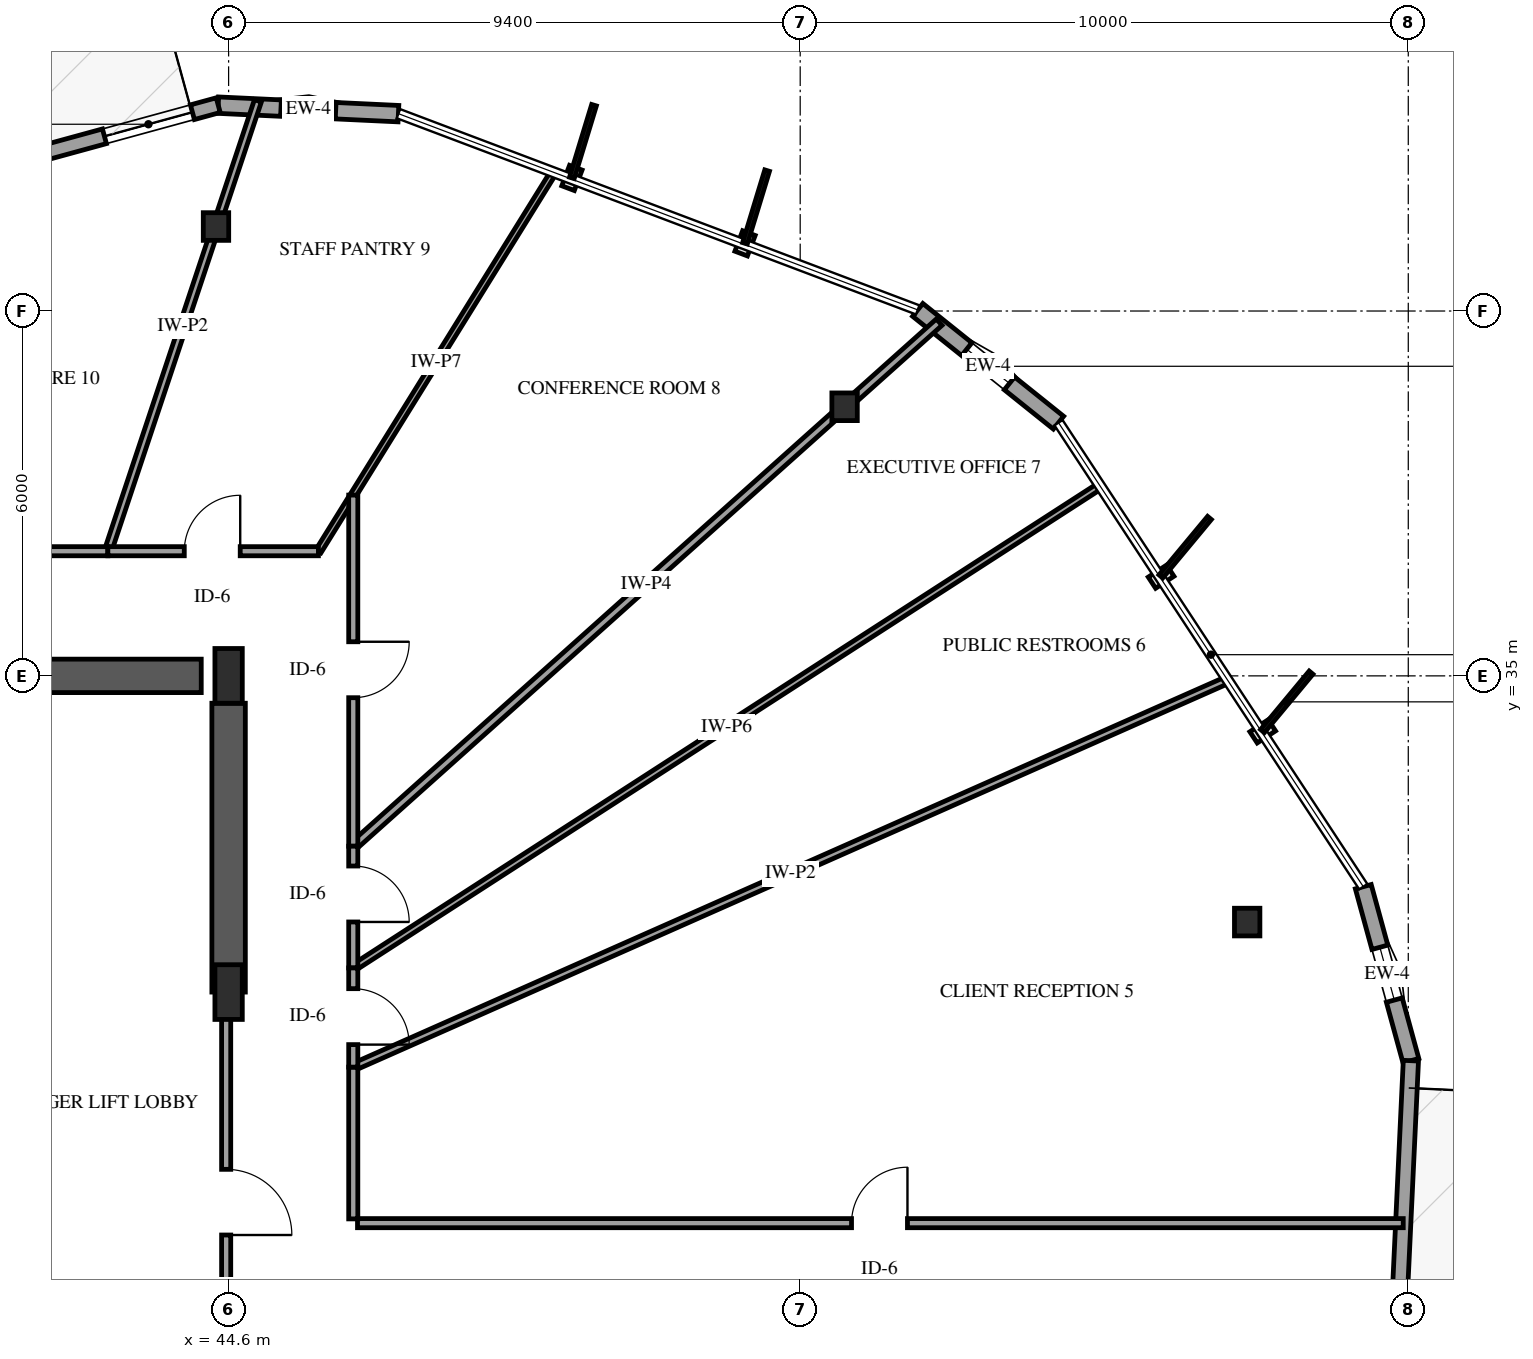
"""IFC4 building model, lengths in metres.
Left out: names, types, materials, properties, quantities, classifications, styles, units other than length and angle.
Written with IfcOpenShell. Run it as: python <this file> out.ifc"""

import sys

from ifc_helpers import new_model, si_unit, direction, frame, frame_2d, origin, origin_2d, place, context, subcontext, project, spatial, rectangle, i_section, extrude, element, fill, save


model = new_model("IFC4")
c1 = context("Model", 3, precision=1e-05, world=origin(), true_north=direction((0.0, 1.0)))
c2 = subcontext(c1, "Body", "Model", "MODEL_VIEW")
j1 = project(units=[si_unit("LENGTHUNIT", "METRE"), si_unit("PLANEANGLEUNIT", "RADIAN")], contexts=[c1])
p1 = place(None, origin())
s1 = spatial("IfcSite", under=j1, at=p1, CompositionType="ELEMENT")
p2 = place(p1, origin())
s2 = spatial("IfcBuilding", under=s1, at=p2, CompositionType="ELEMENT")
p3 = place(p2, frame((0.0, 0.0, 87.4)))
s3 = spatial("IfcBuildingStorey", under=s2, at=p3, CompositionType="ELEMENT", Elevation=87.4)
p4 = place(p3, frame((41.3, 35.0, 0.0), z_axis=(0.0, 0.0, 1.0), x_axis=(1.0, 0.0, 0.0)))
e1 = element("IfcWall", 1, at=p4, inside=s3, PredefinedType="SHEAR", context=c2, shape_type="SweptSolid", body=[
    extrude(rectangle(XDim=2.85, YDim=0.55, at=frame_2d((1.425, 0.0))), origin(), (0.0, 0.0, 1.0), 3.9),
])
p5 = place(p3, frame((44.6, 29.8, 0.0), z_axis=(0.0, 0.0, 1.0), x_axis=(0.0, 1.0, 0.0)))
e2 = element("IfcWall", 2, at=p5, inside=s3, PredefinedType="SHEAR", context=c2, shape_type="SweptSolid", body=[
    extrude(rectangle(XDim=4.75, YDim=0.55, at=frame_2d((2.375, 0.0))), origin(), (0.0, 0.0, 1.0), 3.9),
])
for number, where, z_axis, x_axis in (
    (3, (44.6, 29.8, -0.3), (0.0, 0.0, 1.0), (1.0, 0.0, 0.0)),
    (4, (44.6, 35.0, -0.3), (0.0, 0.0, 1.0), (1.0, 0.0, 0.0)),
):
    element("IfcColumn", number, at=place(p3, frame(where, z_axis=z_axis, x_axis=x_axis)), inside=s3, PredefinedType="PILASTER", context=c2, shape_type="SweptSolid", body=[
        extrude(rectangle(XDim=0.45, YDim=0.9, at=origin_2d()), origin(), (0.0, 0.0, 1.0), 4.2),
    ])
for number, where, z_axis, x_axis in (
    (5, (61.351, 30.951, -0.3), (0.0, 0.0, 1.0), (1.0, 0.0, 0.0)),
    (6, (54.73, 39.425, -0.3), (0.0, 0.0, 1.0), (1.0, 0.0, 0.0)),
    (7, (44.393, 42.389, -0.3), (0.0, 0.0, 1.0), (1.0, 0.0, 0.0)),
):
    element("IfcColumn", number, at=place(p3, frame(where, z_axis=z_axis, x_axis=x_axis)), inside=s3, PredefinedType="COLUMN", context=c2, shape_type="SweptSolid", body=[
        extrude(i_section(OverallWidth=0.418, OverallDepth=0.455, WebThickness=0.042, FlangeThickness=0.068, FilletRadius=0.038, at=origin_2d()), origin(), (0.0, 0.0, 1.0), 4.2),
    ])
p6 = place(p3, frame((58.248, 39.164, 0.0), z_axis=(0.0, 0.0, 1.0), x_axis=(-0.780443081308, 0.625226836307, 0.0)))
e8 = element("IfcWall", 8, at=p6, inside=s3, PredefinedType="SOLIDWALL", context=c2, shape_type="SweptSolid", body=[
    extrude(rectangle(XDim=2.967, YDim=0.27, at=frame_2d((1.483, 0.0))), origin(), (0.0, 0.0, 1.0), 2.979),
])
p7 = place(p6, frame((1.033, 0.0, 0.75)))
e9 = element("IfcOpeningElement", 9, at=p7, cuts=e8, PredefinedType="OPENING", context=c2, shape_type="SweptSolid", body=[
    extrude(rectangle(XDim=0.9, YDim=1.5, at=frame_2d((0.45, 0.75))), frame((0.0, 0.145, 0.0), z_axis=(0.0, -1.0, 0.0), x_axis=(1.0, 0.0, 0.0)), (0.0, 0.0, 1.0), 0.29),
])
p8 = place(p3, frame((47.393, 44.246, 0.0), z_axis=(0.0, 0.0, 1.0), x_axis=(-0.998887602896, 0.04715460508, 0.0)))
e10 = element("IfcWall", 10, at=p8, inside=s3, PredefinedType="SOLIDWALL", context=c2, shape_type="SweptSolid", body=[
    extrude(rectangle(XDim=2.967, YDim=0.27, at=frame_2d((1.483, 0.0))), origin(), (0.0, 0.0, 1.0), 2.979),
])
p9 = place(p8, frame((1.033, 0.0, 0.75)))
e11 = element("IfcOpeningElement", 11, at=p9, cuts=e10, PredefinedType="OPENING", context=c2, shape_type="SweptSolid", body=[
    extrude(rectangle(XDim=0.9, YDim=1.5, at=frame_2d((0.45, 0.75))), frame((0.0, 0.145, 0.0), z_axis=(0.0, -1.0, 0.0), x_axis=(1.0, 0.0, 0.0)), (0.0, 0.0, 1.0), 0.29),
])
p10 = place(p3, frame((44.429, 44.385, 0.0), z_axis=(0.0, 0.0, 1.0), x_axis=(-0.964553074607, -0.263888927894, 0.0)))
e12 = element("IfcWall", 12, at=p10, inside=s3, PredefinedType="SOLIDWALL", context=c2, shape_type="SweptSolid", body=[
    extrude(rectangle(XDim=9.13, YDim=0.25, at=frame_2d((4.565, 0.0))), origin(), (0.0, 0.0, 1.0), 2.979),
])
p11 = place(p10, frame((4.065, 0.0, 0.0)))
e13 = element("IfcOpeningElement", 13, at=p11, cuts=e12, PredefinedType="OPENING", context=c2, shape_type="SweptSolid", body=[
    extrude(rectangle(XDim=1.05, YDim=2.15, at=frame_2d((0.525, 1.075))), frame((0.0, 0.135, 0.0), z_axis=(0.0, -1.0, 0.0), x_axis=(1.0, 0.0, 0.0)), (0.0, 0.0, 1.0), 0.27),
])
p12 = place(p10, frame((0.44, 0.0, 0.72)))
e14 = element("IfcOpeningElement", 14, at=p12, cuts=e12, PredefinedType="OPENING", context=c2, shape_type="SweptSolid", body=[
    extrude(rectangle(XDim=1.5, YDim=1.7, at=frame_2d((0.75, 0.85))), frame((0.0, 0.135, 0.0), z_axis=(0.0, -1.0, 0.0), x_axis=(1.0, 0.0, 0.0)), (0.0, 0.0, 1.0), 0.27),
])
p13 = place(p10, frame((5.755, 0.0, 0.72)))
e15 = element("IfcOpeningElement", 15, at=p13, cuts=e12, PredefinedType="OPENING", context=c2, shape_type="SweptSolid", body=[
    extrude(rectangle(XDim=1.5, YDim=1.7, at=frame_2d((0.75, 0.85))), frame((0.0, 0.135, 0.0), z_axis=(0.0, -1.0, 0.0), x_axis=(1.0, 0.0, 0.0)), (0.0, 0.0, 1.0), 0.27),
])
p14 = place(p3, frame((64.043, 28.672, 0.0), z_axis=(0.0, 0.0, 1.0), x_axis=(-0.263855501226, 0.964562219078, 0.0)))
e16 = element("IfcWall", 16, at=p14, inside=s3, PredefinedType="SOLIDWALL", context=c2, shape_type="SweptSolid", body=[
    extrude(rectangle(XDim=2.967, YDim=0.27, at=frame_2d((1.483, 0.0))), origin(), (0.0, 0.0, 1.0), 2.979),
])
p15 = place(p14, frame((1.033, 0.0, 0.75)))
e17 = element("IfcOpeningElement", 17, at=p15, cuts=e16, PredefinedType="OPENING", context=c2, shape_type="SweptSolid", body=[
    extrude(rectangle(XDim=0.9, YDim=1.5, at=frame_2d((0.45, 0.75))), frame((0.0, 0.145, 0.0), z_axis=(0.0, -1.0, 0.0), x_axis=(1.0, 0.0, 0.0)), (0.0, 0.0, 1.0), 0.29),
])
p16 = place(p3, frame((63.613, 19.552, 0.0), z_axis=(0.0, 0.0, 1.0), x_axis=(0.047119184575, 0.998889274367, 0.0)))
e18 = element("IfcWall", 18, at=p16, inside=s3, PredefinedType="SOLIDWALL", context=c2, shape_type="SweptSolid", body=[
    extrude(rectangle(XDim=9.13, YDim=0.25, at=frame_2d((4.565, 0.0))), origin(), (0.0, 0.0, 1.0), 2.979),
])
p17 = place(p16, frame((0.65, 0.0, 0.0)))
e19 = element("IfcOpeningElement", 19, at=p17, cuts=e18, PredefinedType="OPENING", context=c2, shape_type="SweptSolid", body=[
    extrude(rectangle(XDim=1.05, YDim=2.15, at=frame_2d((0.525, 1.075))), frame((0.0, 0.135, 0.0), z_axis=(0.0, -1.0, 0.0), x_axis=(1.0, 0.0, 0.0)), (0.0, 0.0, 1.0), 0.27),
])
p18 = place(p16, frame((2.34, 0.0, 0.72)))
e20 = element("IfcOpeningElement", 20, at=p18, cuts=e18, PredefinedType="OPENING", context=c2, shape_type="SweptSolid", body=[
    extrude(rectangle(XDim=1.5, YDim=1.7, at=frame_2d((0.75, 0.85))), frame((0.0, 0.135, 0.0), z_axis=(0.0, -1.0, 0.0), x_axis=(1.0, 0.0, 0.0)), (0.0, 0.0, 1.0), 0.27),
])
p19 = place(p3, frame((46.72, 26.0, 0.0), z_axis=(0.0, 0.0, 1.0), x_axis=(1.0, 0.0, 0.0)))
e21 = element("IfcWall", 21, at=p19, inside=s3, PredefinedType="PARTITIONING", context=c2, shape_type="SweptSolid", body=[
    extrude(rectangle(XDim=17.197, YDim=0.15, at=frame_2d((8.599, 0.0))), origin(), (0.0, 0.0, 1.0), 2.974),
])
p20 = place(p19, frame((8.124, 0.0, 0.0)))
e22 = element("IfcOpeningElement", 22, at=p20, cuts=e21, PredefinedType="OPENING", context=c2, shape_type="SweptSolid", body=[
    extrude(rectangle(XDim=0.92, YDim=2.12, at=frame_2d((0.46, 1.06))), frame((0.0, 0.085, 0.0), z_axis=(0.0, -1.0, 0.0), x_axis=(1.0, 0.0, 0.0)), (0.0, 0.0, 1.0), 0.17),
])
p21 = place(p3, frame((46.65, 28.566, 0.0), z_axis=(0.0, 0.0, 1.0), x_axis=(0.91434602256, 0.404933761286, 0.0)))
e23 = element("IfcWall", 23, at=p21, inside=s3, PredefinedType="PARTITIONING", context=c2, shape_type="SweptSolid", body=[
    extrude(rectangle(XDim=15.724, YDim=0.12, at=frame_2d((7.862, 0.0))), origin(), (0.0, 0.0, 1.0), 3.6),
])
p22 = place(p3, frame((46.65, 30.197, 0.0), z_axis=(0.0, 0.0, 1.0), x_axis=(0.840128967458, 0.542386686818, 0.0)))
e24 = element("IfcWall", 24, at=p22, inside=s3, PredefinedType="PARTITIONING", context=c2, shape_type="SweptSolid", body=[
    extrude(rectangle(XDim=14.617, YDim=0.11, at=frame_2d((7.309, 0.0))), origin(), (0.0, 0.0, 1.0), 3.6),
])
p23 = place(p3, frame((46.65, 32.199, 0.0), z_axis=(0.0, 0.0, 1.0), x_axis=(0.745385521988, 0.666633650223, 0.0)))
e25 = element("IfcWall", 25, at=p23, inside=s3, PredefinedType="PARTITIONING", context=c2, shape_type="SweptSolid", body=[
    extrude(rectangle(XDim=12.927, YDim=0.14, at=frame_2d((6.464, 0.0))), origin(), (0.0, 0.0, 1.0), 3.6),
])
p24 = place(p3, frame((42.614, 37.05, 0.0), z_axis=(0.0, 0.0, 1.0), x_axis=(0.316115189383, 0.948720816174, 0.0)))
e26 = element("IfcWall", 26, at=p24, inside=s3, PredefinedType="PARTITIONING", context=c2, shape_type="SweptSolid", body=[
    extrude(rectangle(XDim=7.807, YDim=0.12, at=frame_2d((3.904, 0.0))), origin(), (0.0, 0.0, 1.0), 2.895),
])
p25 = place(p3, frame((34.81, 37.05, 0.0), z_axis=(0.0, 0.0, 1.0), x_axis=(1.0, 0.0, 0.0)))
e27 = element("IfcWall", 27, at=p25, inside=s3, PredefinedType="PARTITIONING", context=c2, shape_type="SweptSolid", body=[
    extrude(rectangle(XDim=7.804, YDim=0.15, at=frame_2d((3.902, 0.0))), origin(), (0.0, 0.0, 1.0), 3.6),
])
p26 = place(p25, frame((3.427, 0.0, 0.0)))
e28 = element("IfcOpeningElement", 28, at=p26, cuts=e27, PredefinedType="OPENING", context=c2, shape_type="SweptSolid", body=[
    extrude(rectangle(XDim=0.92, YDim=2.12, at=frame_2d((0.46, 1.06))), frame((0.0, 0.085, 0.0), z_axis=(0.0, -1.0, 0.0), x_axis=(1.0, 0.0, 0.0)), (0.0, 0.0, 1.0), 0.17),
])
p27 = place(p3, frame((46.077, 37.05, 0.0), z_axis=(0.0, 0.0, 1.0), x_axis=(0.527273368445, 0.849695707256, 0.0)))
e29 = element("IfcWall", 29, at=p27, inside=s3, PredefinedType="PARTITIONING", context=c2, shape_type="SweptSolid", body=[
    extrude(rectangle(XDim=7.334, YDim=0.1, at=frame_2d((3.667, 0.0))), origin(), (0.0, 0.0, 1.0), 3.6),
])
p28 = place(p3, frame((44.56, 29.8, 0.0), z_axis=(0.0, 0.0, 1.0), x_axis=(0.0, -1.0, 0.0)))
e30 = element("IfcWall", 30, at=p28, inside=s3, PredefinedType="PARTITIONING", context=c2, shape_type="SweptSolid", body=[
    extrude(rectangle(XDim=6.91, YDim=0.15, at=frame_2d((3.455, 0.0))), origin(), (0.0, 0.0, 1.0), 2.64),
])
p29 = place(p28, frame((2.915, 0.0, 0.0)))
e31 = element("IfcOpeningElement", 31, at=p29, cuts=e30, PredefinedType="OPENING", context=c2, shape_type="SweptSolid", body=[
    extrude(rectangle(XDim=1.08, YDim=2.15, at=frame_2d((0.54, 1.075))), frame((0.0, 0.085, 0.0), z_axis=(0.0, -1.0, 0.0), x_axis=(1.0, 0.0, 0.0)), (0.0, 0.0, 1.0), 0.17),
])
p30 = place(p3, frame((46.65, 37.973, 0.0), z_axis=(0.0, 0.0, 1.0), x_axis=(0.0, -1.0, 0.0)))
e32 = element("IfcWall", 32, at=p30, inside=s3, PredefinedType="PARTITIONING", context=c2, shape_type="SweptSolid", body=[
    extrude(rectangle(XDim=5.774, YDim=0.15, at=frame_2d((2.887, 0.0))), origin(), (0.0, 0.0, 1.0), 3.6),
])
p31 = place(p30, frame((2.412, 0.0, 0.0)))
e33 = element("IfcOpeningElement", 33, at=p31, cuts=e32, PredefinedType="OPENING", context=c2, shape_type="SweptSolid", body=[
    extrude(rectangle(XDim=0.92, YDim=2.12, at=frame_2d((0.46, 1.06))), frame((0.0, 0.085, 0.0), z_axis=(0.0, -1.0, 0.0), x_axis=(1.0, 0.0, 0.0)), (0.0, 0.0, 1.0), 0.17),
])
p32 = place(p3, frame((42.614, 37.05, 0.0), z_axis=(0.0, 0.0, 1.0), x_axis=(1.0, 0.0, 0.0)))
e34 = element("IfcWall", 34, at=p32, inside=s3, PredefinedType="PARTITIONING", context=c2, shape_type="SweptSolid", body=[
    extrude(rectangle(XDim=3.463, YDim=0.15, at=frame_2d((1.731, 0.0))), origin(), (0.0, 0.0, 1.0), 3.6),
])
p33 = place(p32, frame((1.257, 0.0, 0.0)))
e35 = element("IfcOpeningElement", 35, at=p33, cuts=e34, PredefinedType="OPENING", context=c2, shape_type="SweptSolid", body=[
    extrude(rectangle(XDim=0.92, YDim=2.12, at=frame_2d((0.46, 1.06))), frame((0.0, 0.085, 0.0), z_axis=(0.0, -1.0, 0.0), x_axis=(1.0, 0.0, 0.0)), (0.0, 0.0, 1.0), 0.17),
])
p34 = place(p3, frame((46.65, 28.566, 0.0), z_axis=(0.0, 0.0, 1.0), x_axis=(0.0, -1.0, 0.0)))
e36 = element("IfcWall", 36, at=p34, inside=s3, PredefinedType="PARTITIONING", context=c2, shape_type="SweptSolid", body=[
    extrude(rectangle(XDim=2.496, YDim=0.15, at=frame_2d((1.248, 0.0))), origin(), (0.0, 0.0, 1.0), 3.6),
])
p35 = place(p3, frame((46.65, 32.199, 0.0), z_axis=(0.0, 0.0, 1.0), x_axis=(0.0, -1.0, 0.0)))
e37 = element("IfcWall", 37, at=p35, inside=s3, PredefinedType="PARTITIONING", context=c2, shape_type="SweptSolid", body=[
    extrude(rectangle(XDim=2.002, YDim=0.15, at=frame_2d((1.001, 0.0))), origin(), (0.0, 0.0, 1.0), 3.6),
])
p36 = place(p35, frame((0.326, 0.0, 0.0)))
e38 = element("IfcOpeningElement", 38, at=p36, cuts=e37, PredefinedType="OPENING", context=c2, shape_type="SweptSolid", body=[
    extrude(rectangle(XDim=0.92, YDim=2.12, at=frame_2d((0.46, 1.06))), frame((0.0, 0.085, 0.0), z_axis=(0.0, -1.0, 0.0), x_axis=(1.0, 0.0, 0.0)), (0.0, 0.0, 1.0), 0.17),
])
p37 = place(p3, frame((46.65, 30.197, 0.0), z_axis=(0.0, 0.0, 1.0), x_axis=(0.0, -1.0, 0.0)))
e39 = element("IfcWall", 39, at=p37, inside=s3, PredefinedType="PARTITIONING", context=c2, shape_type="SweptSolid", body=[
    extrude(rectangle(XDim=1.631, YDim=0.15, at=frame_2d((0.815, 0.0))), origin(), (0.0, 0.0, 1.0), 3.6),
])
p38 = place(p37, frame((0.341, 0.0, 0.0)))
e40 = element("IfcOpeningElement", 40, at=p38, cuts=e39, PredefinedType="OPENING", context=c2, shape_type="SweptSolid", body=[
    extrude(rectangle(XDim=0.92, YDim=2.12, at=frame_2d((0.46, 1.06))), frame((0.0, 0.085, 0.0), z_axis=(0.0, -1.0, 0.0), x_axis=(1.0, 0.0, 0.0)), (0.0, 0.0, 1.0), 0.17),
])
p39 = place(p7, origin())
e41 = element("IfcWindow", 41, at=p39, inside=s3, PartitioningType="SINGLE_PANEL", PredefinedType="WINDOW", context=c2, shape_type="SweptSolid", body=[
    extrude(rectangle(XDim=0.9, YDim=1.5, at=frame_2d((0.45, 0.75))), frame((0.0, 0.03, 0.0), z_axis=(0.0, -1.0, 0.0), x_axis=(1.0, 0.0, 0.0)), (0.0, 0.0, 1.0), 0.06),
])
fill(e9, e41)
p40 = place(p9, origin())
e42 = element("IfcWindow", 42, at=p40, inside=s3, PartitioningType="SINGLE_PANEL", PredefinedType="WINDOW", context=c2, shape_type="SweptSolid", body=[
    extrude(rectangle(XDim=0.9, YDim=1.5, at=frame_2d((0.45, 0.75))), frame((0.0, 0.03, 0.0), z_axis=(0.0, -1.0, 0.0), x_axis=(1.0, 0.0, 0.0)), (0.0, 0.0, 1.0), 0.06),
])
fill(e11, e42)
p41 = place(p12, origin())
e43 = element("IfcWindow", 43, at=p41, inside=s3, PartitioningType="SINGLE_PANEL", PredefinedType="WINDOW", context=c2, shape_type="SweptSolid", body=[
    extrude(rectangle(XDim=1.5, YDim=1.7, at=frame_2d((0.75, 0.85))), frame((0.0, 0.03, 0.0), z_axis=(0.0, -1.0, 0.0), x_axis=(1.0, 0.0, 0.0)), (0.0, 0.0, 1.0), 0.06),
])
fill(e14, e43)
p42 = place(p15, origin())
e44 = element("IfcWindow", 44, at=p42, inside=s3, PartitioningType="SINGLE_PANEL", PredefinedType="WINDOW", context=c2, shape_type="SweptSolid", body=[
    extrude(rectangle(XDim=0.9, YDim=1.5, at=frame_2d((0.45, 0.75))), frame((0.0, 0.03, 0.0), z_axis=(0.0, -1.0, 0.0), x_axis=(1.0, 0.0, 0.0)), (0.0, 0.0, 1.0), 0.06),
])
fill(e17, e44)
p43 = place(p20, origin())
e45 = element("IfcDoor", 45, at=p43, inside=s3, OperationType="SINGLE_SWING_RIGHT", PredefinedType="DOOR", context=c2, shape_type="SweptSolid", body=[
    extrude(rectangle(XDim=0.92, YDim=2.12, at=frame_2d((0.46, 1.06))), frame((0.0, 0.025, 0.0), z_axis=(0.0, -1.0, 0.0), x_axis=(1.0, 0.0, 0.0)), (0.0, 0.0, 1.0), 0.05),
])
fill(e22, e45)
p44 = place(p29, origin())
e46 = element("IfcDoor", 46, at=p44, inside=s3, OperationType="SINGLE_SWING_RIGHT", PredefinedType="DOOR", context=c2, shape_type="SweptSolid", body=[
    extrude(rectangle(XDim=1.08, YDim=2.15, at=frame_2d((0.54, 1.075))), frame((0.0, 0.025, 0.0), z_axis=(0.0, -1.0, 0.0), x_axis=(1.0, 0.0, 0.0)), (0.0, 0.0, 1.0), 0.05),
])
fill(e31, e46)
p45 = place(p31, origin())
e47 = element("IfcDoor", 47, at=p45, inside=s3, OperationType="SINGLE_SWING_LEFT", PredefinedType="DOOR", context=c2, shape_type="SweptSolid", body=[
    extrude(rectangle(XDim=0.92, YDim=2.12, at=frame_2d((0.46, 1.06))), frame((0.0, 0.025, 0.0), z_axis=(0.0, -1.0, 0.0), x_axis=(1.0, 0.0, 0.0)), (0.0, 0.0, 1.0), 0.05),
])
fill(e33, e47)
p46 = place(p33, origin())
e48 = element("IfcDoor", 48, at=p46, inside=s3, OperationType="SINGLE_SWING_RIGHT", PredefinedType="DOOR", context=c2, shape_type="SweptSolid", body=[
    extrude(rectangle(XDim=0.92, YDim=2.12, at=frame_2d((0.46, 1.06))), frame((0.0, 0.025, 0.0), z_axis=(0.0, -1.0, 0.0), x_axis=(1.0, 0.0, 0.0)), (0.0, 0.0, 1.0), 0.05),
])
fill(e35, e48)
p47 = place(p36, origin())
e49 = element("IfcDoor", 49, at=p47, inside=s3, OperationType="SINGLE_SWING_RIGHT", PredefinedType="DOOR", context=c2, shape_type="SweptSolid", body=[
    extrude(rectangle(XDim=0.92, YDim=2.12, at=frame_2d((0.46, 1.06))), frame((0.0, 0.025, 0.0), z_axis=(0.0, -1.0, 0.0), x_axis=(1.0, 0.0, 0.0)), (0.0, 0.0, 1.0), 0.05),
])
fill(e38, e49)
p48 = place(p38, origin())
e50 = element("IfcDoor", 50, at=p48, inside=s3, OperationType="SINGLE_SWING_RIGHT", PredefinedType="DOOR", context=c2, shape_type="SweptSolid", body=[
    extrude(rectangle(XDim=0.92, YDim=2.12, at=frame_2d((0.46, 1.06))), frame((0.0, 0.025, 0.0), z_axis=(0.0, -1.0, 0.0), x_axis=(1.0, 0.0, 0.0)), (0.0, 0.0, 1.0), 0.05),
])
fill(e40, e50)
save(model, sys.argv[1])
